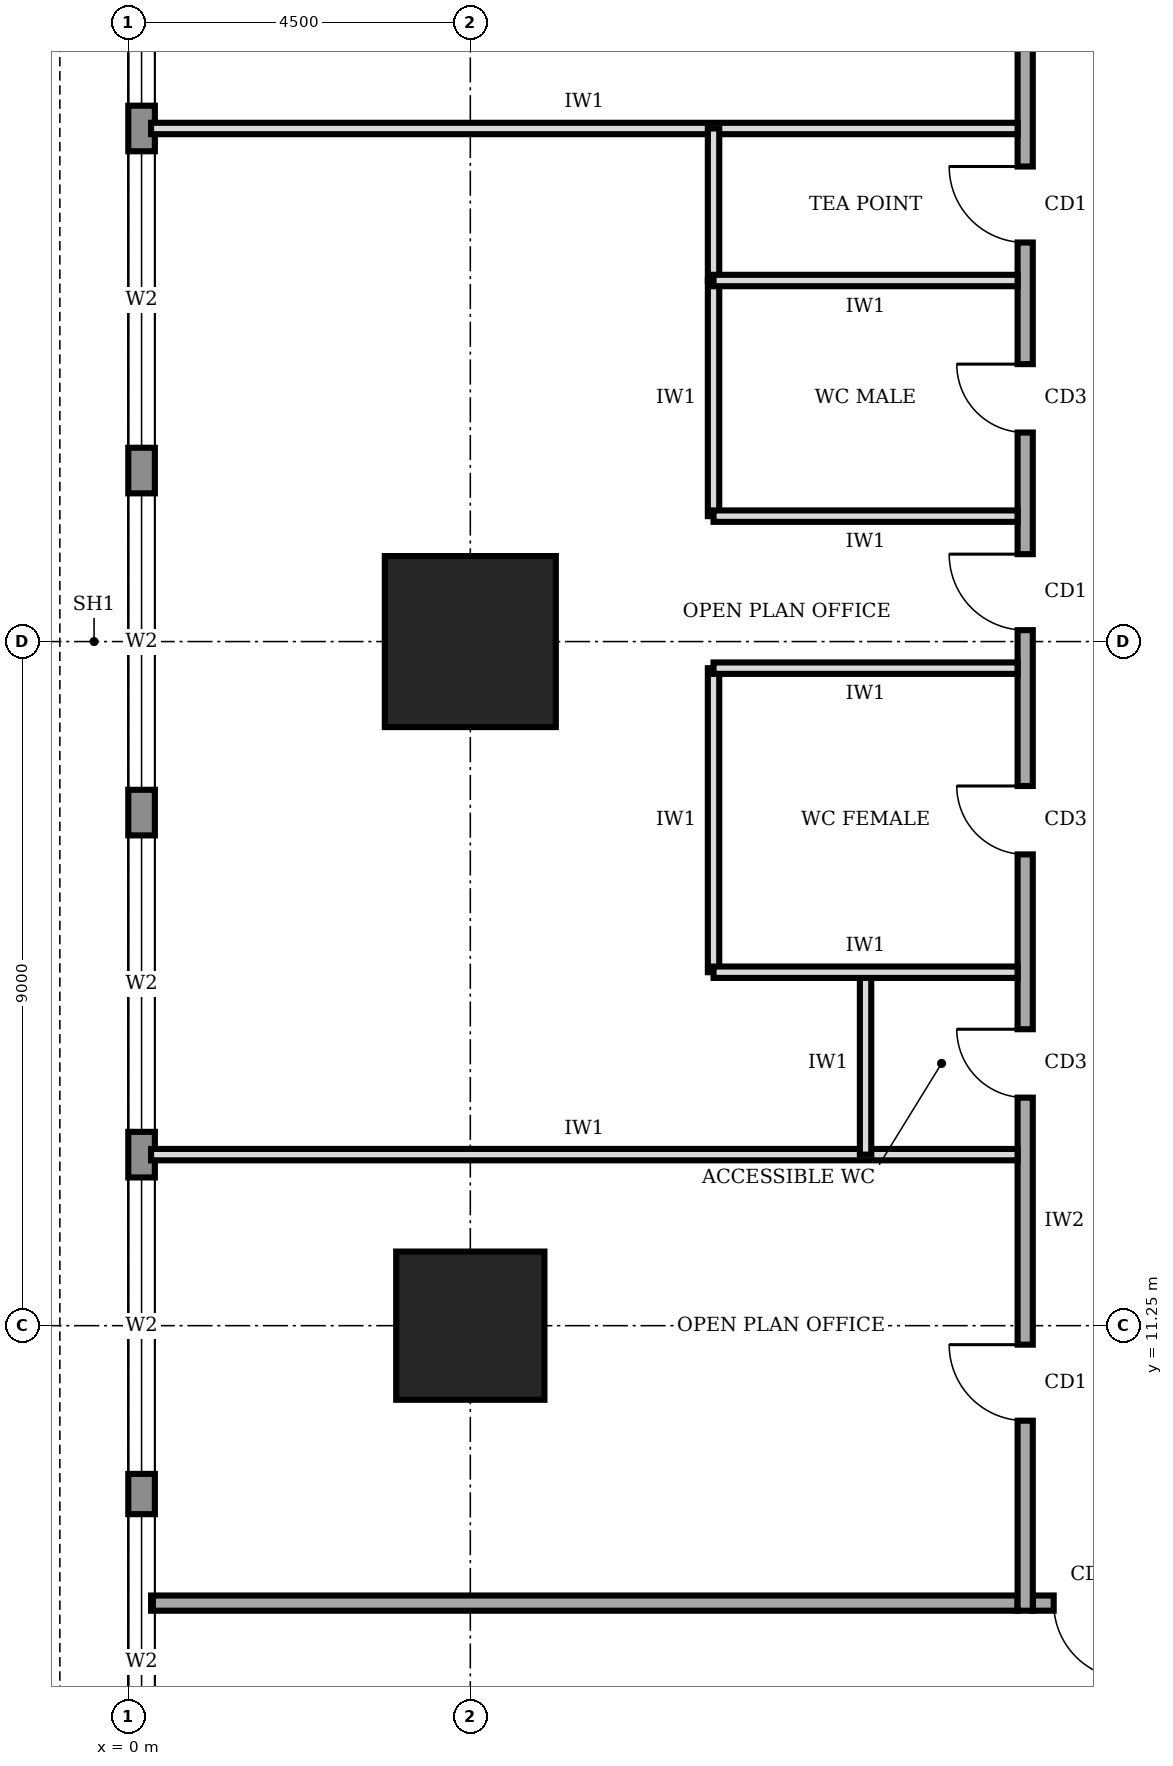
"""IFC4 building model, lengths in metres.
Left out: names, types, materials, properties, quantities, classifications, styles, units other than length and angle.
Written with IfcOpenShell. Run it as: python <this file> out.ifc"""

import sys

from ifc_helpers import new_model, si_unit, direction, frame, frame_2d, origin, origin_2d, place, context, subcontext, project, spatial, rectangle, extrude, element, fill, save


model = new_model("IFC4")
c1 = context("Model", 3, precision=1e-05, world=origin(), true_north=direction((0.0, 1.0)))
c2 = subcontext(c1, "Body", "Model", "MODEL_VIEW")
j1 = project(units=[si_unit("LENGTHUNIT", "METRE"), si_unit("PLANEANGLEUNIT", "RADIAN")], contexts=[c1])
p1 = place(None, origin())
s1 = spatial("IfcSite", under=j1, at=p1, CompositionType="ELEMENT")
p2 = place(p1, origin())
s2 = spatial("IfcBuilding", under=s1, at=p2, CompositionType="ELEMENT")
p3 = place(p2, frame((0.0, 0.0, 241.0)))
s3 = spatial("IfcBuildingStorey", under=s2, at=p3, CompositionType="ELEMENT", Elevation=241.0)
p4 = place(p3, frame((4.5, 11.25, 0.0), z_axis=(0.0, 0.0, 1.0), x_axis=(1.0, 0.0, 0.0)))
e1 = element("IfcColumn", 1, at=p4, inside=s3, PredefinedType="COLUMN", context=c2, shape_type="SweptSolid", body=[
    extrude(rectangle(XDim=1.95, YDim=1.95, at=origin_2d()), origin(), (0.0, 0.0, 1.0), 4.0),
])
p5 = place(p3, frame((4.5, 20.25, 0.0), z_axis=(0.0, 0.0, 1.0), x_axis=(1.0, 0.0, 0.0)))
e2 = element("IfcColumn", 2, at=p5, inside=s3, PredefinedType="COLUMN", context=c2, shape_type="SweptSolid", body=[
    extrude(rectangle(XDim=2.25, YDim=2.25, at=origin_2d()), origin(), (0.0, 0.0, 1.0), 4.0),
])
p6 = place(p3, frame((0.175, 35.98, 0.0), z_axis=(0.0, 0.0, 1.0), x_axis=(0.0, -1.0, 0.0)))
e3 = element("IfcWall", 3, at=p6, inside=s3, PredefinedType="STANDARD", context=c2, shape_type="SweptSolid", body=[
    extrude(rectangle(XDim=31.46, YDim=0.35, at=frame_2d((15.73, 0.0))), origin(), (0.0, 0.0, 1.0), 3.75),
])
p7 = place(p6, frame((27.21, 0.0, 0.6)))
e4 = element("IfcOpeningElement", 4, at=p7, cuts=e3, PredefinedType="OPENING", context=c2, shape_type="SweptSolid", body=[
    extrude(rectangle(XDim=3.9, YDim=2.6, at=frame_2d((1.95, 1.3))), frame((0.0, 0.185, 0.0), z_axis=(0.0, -1.0, 0.0), x_axis=(1.0, 0.0, 0.0)), (0.0, 0.0, 1.0), 0.37),
])
p8 = place(p6, frame((22.78, 0.0, 0.6)))
e5 = element("IfcOpeningElement", 5, at=p8, cuts=e3, PredefinedType="OPENING", context=c2, shape_type="SweptSolid", body=[
    extrude(rectangle(XDim=3.9, YDim=2.6, at=frame_2d((1.95, 1.3))), frame((0.0, 0.185, 0.0), z_axis=(0.0, -1.0, 0.0), x_axis=(1.0, 0.0, 0.0)), (0.0, 0.0, 1.0), 0.37),
])
p9 = place(p6, frame((18.28, 0.0, 0.6)))
e6 = element("IfcOpeningElement", 6, at=p9, cuts=e3, PredefinedType="OPENING", context=c2, shape_type="SweptSolid", body=[
    extrude(rectangle(XDim=3.9, YDim=2.6, at=frame_2d((1.95, 1.3))), frame((0.0, 0.185, 0.0), z_axis=(0.0, -1.0, 0.0), x_axis=(1.0, 0.0, 0.0)), (0.0, 0.0, 1.0), 0.37),
])
p10 = place(p6, frame((13.78, 0.0, 0.6)))
e7 = element("IfcOpeningElement", 7, at=p10, cuts=e3, PredefinedType="OPENING", context=c2, shape_type="SweptSolid", body=[
    extrude(rectangle(XDim=3.9, YDim=2.6, at=frame_2d((1.95, 1.3))), frame((0.0, 0.185, 0.0), z_axis=(0.0, -1.0, 0.0), x_axis=(1.0, 0.0, 0.0)), (0.0, 0.0, 1.0), 0.37),
])
p11 = place(p6, frame((9.28, 0.0, 0.6)))
e8 = element("IfcOpeningElement", 8, at=p11, cuts=e3, PredefinedType="OPENING", context=c2, shape_type="SweptSolid", body=[
    extrude(rectangle(XDim=3.9, YDim=2.6, at=frame_2d((1.95, 1.3))), frame((0.0, 0.185, 0.0), z_axis=(0.0, -1.0, 0.0), x_axis=(1.0, 0.0, 0.0)), (0.0, 0.0, 1.0), 0.37),
])
p12 = place(p6, frame((4.78, 0.0, 0.6)))
e9 = element("IfcOpeningElement", 9, at=p12, cuts=e3, PredefinedType="OPENING", context=c2, shape_type="SweptSolid", body=[
    extrude(rectangle(XDim=3.9, YDim=2.6, at=frame_2d((1.95, 1.3))), frame((0.0, 0.185, 0.0), z_axis=(0.0, -1.0, 0.0), x_axis=(1.0, 0.0, 0.0)), (0.0, 0.0, 1.0), 0.37),
])
p13 = place(p3, frame((11.9, 7.6, 0.0), z_axis=(0.0, 0.0, 1.0), x_axis=(1.0, 0.0, 0.0)))
e10 = element("IfcWall", 10, at=p13, inside=s3, PredefinedType="SOLIDWALL", context=c2, shape_type="SweptSolid", body=[
    extrude(rectangle(XDim=16.9, YDim=0.2, at=frame_2d((8.45, 0.0))), origin(), (0.0, 0.0, 1.0), 3.75),
])
p14 = place(p13, frame((0.275, 0.0, 0.0)))
e11 = element("IfcOpeningElement", 11, at=p14, cuts=e10, PredefinedType="OPENING", context=c2, shape_type="SweptSolid", body=[
    extrude(rectangle(XDim=1.0, YDim=2.1, at=frame_2d((0.5, 1.05))), frame((0.0, 0.11, 0.0), z_axis=(0.0, -1.0, 0.0), x_axis=(1.0, 0.0, 0.0)), (0.0, 0.0, 1.0), 0.22),
])
p15 = place(p3, frame((11.8, 32.8, 0.0), z_axis=(0.0, 0.0, 1.0), x_axis=(0.0, -1.0, 0.0)))
e12 = element("IfcWall", 12, at=p15, inside=s3, PredefinedType="SOLIDWALL", context=c2, shape_type="SweptSolid", body=[
    extrude(rectangle(XDim=25.3, YDim=0.2, at=frame_2d((12.65, 0.0))), origin(), (0.0, 0.0, 1.0), 3.75),
])
p16 = place(p15, frame((21.8, 0.0, 0.0)))
e13 = element("IfcOpeningElement", 13, at=p16, cuts=e12, PredefinedType="OPENING", context=c2, shape_type="SweptSolid", body=[
    extrude(rectangle(XDim=1.0, YDim=2.1, at=frame_2d((0.5, 1.05))), frame((0.0, 0.11, 0.0), z_axis=(0.0, -1.0, 0.0), x_axis=(1.0, 0.0, 0.0)), (0.0, 0.0, 1.0), 0.22),
])
p17 = place(p15, frame((17.65, 0.0, 0.0)))
e14 = element("IfcOpeningElement", 14, at=p17, cuts=e12, PredefinedType="OPENING", context=c2, shape_type="SweptSolid", body=[
    extrude(rectangle(XDim=0.9, YDim=2.1, at=frame_2d((0.45, 1.05))), frame((0.0, 0.11, 0.0), z_axis=(0.0, -1.0, 0.0), x_axis=(1.0, 0.0, 0.0)), (0.0, 0.0, 1.0), 0.22),
])
p18 = place(p15, frame((14.45, 0.0, 0.0)))
e15 = element("IfcOpeningElement", 15, at=p18, cuts=e12, PredefinedType="OPENING", context=c2, shape_type="SweptSolid", body=[
    extrude(rectangle(XDim=0.9, YDim=2.1, at=frame_2d((0.45, 1.05))), frame((0.0, 0.11, 0.0), z_axis=(0.0, -1.0, 0.0), x_axis=(1.0, 0.0, 0.0)), (0.0, 0.0, 1.0), 0.22),
])
p19 = place(p15, frame((8.9, 0.0, 0.0)))
e16 = element("IfcOpeningElement", 16, at=p19, cuts=e12, PredefinedType="OPENING", context=c2, shape_type="SweptSolid", body=[
    extrude(rectangle(XDim=0.9, YDim=2.1, at=frame_2d((0.45, 1.05))), frame((0.0, 0.11, 0.0), z_axis=(0.0, -1.0, 0.0), x_axis=(1.0, 0.0, 0.0)), (0.0, 0.0, 1.0), 0.22),
])
p20 = place(p15, frame((6.3, 0.0, 0.0)))
e17 = element("IfcOpeningElement", 17, at=p20, cuts=e12, PredefinedType="OPENING", context=c2, shape_type="SweptSolid", body=[
    extrude(rectangle(XDim=1.0, YDim=2.1, at=frame_2d((0.5, 1.05))), frame((0.0, 0.11, 0.0), z_axis=(0.0, -1.0, 0.0), x_axis=(1.0, 0.0, 0.0)), (0.0, 0.0, 1.0), 0.22),
])
p21 = place(p15, frame((11.4, 0.0, 0.0)))
e18 = element("IfcOpeningElement", 18, at=p21, cuts=e12, PredefinedType="OPENING", context=c2, shape_type="SweptSolid", body=[
    extrude(rectangle(XDim=1.0, YDim=2.1, at=frame_2d((0.5, 1.05))), frame((0.0, 0.11, 0.0), z_axis=(0.0, -1.0, 0.0), x_axis=(1.0, 0.0, 0.0)), (0.0, 0.0, 1.0), 0.22),
])
p22 = place(p15, frame((2.3, 0.0, 0.0)))
e19 = element("IfcOpeningElement", 19, at=p22, cuts=e12, PredefinedType="OPENING", context=c2, shape_type="SweptSolid", body=[
    extrude(rectangle(XDim=1.0, YDim=2.1, at=frame_2d((0.5, 1.05))), frame((0.0, 0.11, 0.0), z_axis=(0.0, -1.0, 0.0), x_axis=(1.0, 0.0, 0.0)), (0.0, 0.0, 1.0), 0.22),
])
p23 = place(p3, frame((0.3, 7.6, 0.0), z_axis=(0.0, 0.0, 1.0), x_axis=(1.0, 0.0, 0.0)))
e20 = element("IfcWall", 20, at=p23, inside=s3, PredefinedType="SOLIDWALL", context=c2, shape_type="SweptSolid", body=[
    extrude(rectangle(XDim=11.4, YDim=0.2, at=frame_2d((5.7, 0.0))), origin(), (0.0, 0.0, 1.0), 3.75),
])
for number, where, z_axis, x_axis in (
    (21, (0.3, 13.5, 0.0), (0.0, 0.0, 1.0), (1.0, 0.0, 0.0)),
    (22, (0.3, 27.0, 0.0), (0.0, 0.0, 1.0), (1.0, 0.0, 0.0)),
):
    element("IfcWall", number, at=place(p3, frame(where, z_axis=z_axis, x_axis=x_axis)), inside=s3, PredefinedType="PARTITIONING", context=c2, shape_type="SweptSolid", body=[
        extrude(rectangle(XDim=11.4, YDim=0.15, at=frame_2d((5.7, 0.0))), origin(), (0.0, 0.0, 1.0), 3.75),
    ])
for number, where, z_axis, x_axis in (
    (23, (11.7, 15.9, 0.0), (0.0, 0.0, 1.0), (-1.0, 0.0, 0.0)),
    (24, (11.7, 19.9, 0.0), (0.0, 0.0, 1.0), (-1.0, 0.0, 0.0)),
    (25, (11.7, 21.9, 0.0), (0.0, 0.0, 1.0), (-1.0, 0.0, 0.0)),
    (26, (11.7, 25.0, 0.0), (0.0, 0.0, 1.0), (-1.0, 0.0, 0.0)),
):
    element("IfcWall", number, at=place(p3, frame(where, z_axis=z_axis, x_axis=x_axis)), inside=s3, PredefinedType="PARTITIONING", context=c2, shape_type="SweptSolid", body=[
        extrude(rectangle(XDim=4.0, YDim=0.15, at=frame_2d((2.0, 0.0))), origin(), (0.0, 0.0, 1.0), 3.75),
    ])
p24 = place(p3, frame((9.7, 13.5, 0.0), z_axis=(0.0, 0.0, 1.0), x_axis=(0.0, 1.0, 0.0)))
e27 = element("IfcWall", 27, at=p24, inside=s3, PredefinedType="PARTITIONING", context=c2, shape_type="SweptSolid", body=[
    extrude(rectangle(XDim=2.4, YDim=0.15, at=frame_2d((1.2, 0.0))), origin(), (0.0, 0.0, 1.0), 3.75),
])
p25 = place(p3, frame((7.7, 15.9, 0.0), z_axis=(0.0, 0.0, 1.0), x_axis=(0.0, 1.0, 0.0)))
e28 = element("IfcWall", 28, at=p25, inside=s3, PredefinedType="PARTITIONING", context=c2, shape_type="SweptSolid", body=[
    extrude(rectangle(XDim=4.0, YDim=0.15, at=frame_2d((2.0, 0.0))), origin(), (0.0, 0.0, 1.0), 3.75),
])
p26 = place(p3, frame((7.7, 21.9, 0.0), z_axis=(0.0, 0.0, 1.0), x_axis=(0.0, 1.0, 0.0)))
e29 = element("IfcWall", 29, at=p26, inside=s3, PredefinedType="PARTITIONING", context=c2, shape_type="SweptSolid", body=[
    extrude(rectangle(XDim=3.1, YDim=0.15, at=frame_2d((1.55, 0.0))), origin(), (0.0, 0.0, 1.0), 3.75),
])
p27 = place(p3, frame((7.7, 25.0, 0.0), z_axis=(0.0, 0.0, 1.0), x_axis=(0.0, 1.0, 0.0)))
e30 = element("IfcWall", 30, at=p27, inside=s3, PredefinedType="PARTITIONING", context=c2, shape_type="SweptSolid", body=[
    extrude(rectangle(XDim=2.0, YDim=0.15, at=frame_2d((1.0, 0.0))), origin(), (0.0, 0.0, 1.0), 3.75),
])
p28 = place(p7, origin())
e31 = element("IfcWindow", 31, at=p28, inside=s3, PartitioningType="SINGLE_PANEL", PredefinedType="WINDOW", context=c2, shape_type="SweptSolid", body=[
    extrude(rectangle(XDim=3.9, YDim=2.6, at=frame_2d((1.95, 1.3))), frame((0.0, 0.03, 0.0), z_axis=(0.0, -1.0, 0.0), x_axis=(1.0, 0.0, 0.0)), (0.0, 0.0, 1.0), 0.06),
])
fill(e4, e31)
p29 = place(p8, origin())
e32 = element("IfcWindow", 32, at=p29, inside=s3, PartitioningType="SINGLE_PANEL", PredefinedType="WINDOW", context=c2, shape_type="SweptSolid", body=[
    extrude(rectangle(XDim=3.9, YDim=2.6, at=frame_2d((1.95, 1.3))), frame((0.0, 0.03, 0.0), z_axis=(0.0, -1.0, 0.0), x_axis=(1.0, 0.0, 0.0)), (0.0, 0.0, 1.0), 0.06),
])
fill(e5, e32)
p30 = place(p9, origin())
e33 = element("IfcWindow", 33, at=p30, inside=s3, PartitioningType="SINGLE_PANEL", PredefinedType="WINDOW", context=c2, shape_type="SweptSolid", body=[
    extrude(rectangle(XDim=3.9, YDim=2.6, at=frame_2d((1.95, 1.3))), frame((0.0, 0.03, 0.0), z_axis=(0.0, -1.0, 0.0), x_axis=(1.0, 0.0, 0.0)), (0.0, 0.0, 1.0), 0.06),
])
fill(e6, e33)
p31 = place(p10, origin())
e34 = element("IfcWindow", 34, at=p31, inside=s3, PartitioningType="SINGLE_PANEL", PredefinedType="WINDOW", context=c2, shape_type="SweptSolid", body=[
    extrude(rectangle(XDim=3.9, YDim=2.6, at=frame_2d((1.95, 1.3))), frame((0.0, 0.03, 0.0), z_axis=(0.0, -1.0, 0.0), x_axis=(1.0, 0.0, 0.0)), (0.0, 0.0, 1.0), 0.06),
])
fill(e7, e34)
p32 = place(p11, origin())
e35 = element("IfcWindow", 35, at=p32, inside=s3, PartitioningType="SINGLE_PANEL", PredefinedType="WINDOW", context=c2, shape_type="SweptSolid", body=[
    extrude(rectangle(XDim=3.9, YDim=2.6, at=frame_2d((1.95, 1.3))), frame((0.0, 0.03, 0.0), z_axis=(0.0, -1.0, 0.0), x_axis=(1.0, 0.0, 0.0)), (0.0, 0.0, 1.0), 0.06),
])
fill(e8, e35)
p33 = place(p12, origin())
e36 = element("IfcWindow", 36, at=p33, inside=s3, PartitioningType="SINGLE_PANEL", PredefinedType="WINDOW", context=c2, shape_type="SweptSolid", body=[
    extrude(rectangle(XDim=3.9, YDim=2.6, at=frame_2d((1.95, 1.3))), frame((0.0, 0.03, 0.0), z_axis=(0.0, -1.0, 0.0), x_axis=(1.0, 0.0, 0.0)), (0.0, 0.0, 1.0), 0.06),
])
fill(e9, e36)
p34 = place(p14, frame((1.0, 0.0, 0.0), z_axis=(0.0, 0.0, 1.0), x_axis=(-1.0, 0.0, 0.0)))
e37 = element("IfcDoor", 37, at=p34, inside=s3, OperationType="SINGLE_SWING_LEFT", PredefinedType="DOOR", context=c2, shape_type="SweptSolid", body=[
    extrude(rectangle(XDim=1.0, YDim=2.1, at=frame_2d((0.5, 1.05))), frame((0.0, 0.025, 0.0), z_axis=(0.0, -1.0, 0.0), x_axis=(1.0, 0.0, 0.0)), (0.0, 0.0, 1.0), 0.05),
])
fill(e11, e37)
p35 = place(p16, frame((1.0, 0.0, 0.0), z_axis=(0.0, 0.0, 1.0), x_axis=(-1.0, 0.0, 0.0)))
e38 = element("IfcDoor", 38, at=p35, inside=s3, OperationType="SINGLE_SWING_RIGHT", PredefinedType="DOOR", context=c2, shape_type="SweptSolid", body=[
    extrude(rectangle(XDim=1.0, YDim=2.1, at=frame_2d((0.5, 1.05))), frame((0.0, 0.025, 0.0), z_axis=(0.0, -1.0, 0.0), x_axis=(1.0, 0.0, 0.0)), (0.0, 0.0, 1.0), 0.05),
])
fill(e13, e38)
p36 = place(p17, frame((0.9, 0.0, 0.0), z_axis=(0.0, 0.0, 1.0), x_axis=(-1.0, 0.0, 0.0)))
e39 = element("IfcDoor", 39, at=p36, inside=s3, OperationType="SINGLE_SWING_RIGHT", PredefinedType="DOOR", context=c2, shape_type="SweptSolid", body=[
    extrude(rectangle(XDim=0.9, YDim=2.1, at=frame_2d((0.45, 1.05))), frame((0.0, 0.025, 0.0), z_axis=(0.0, -1.0, 0.0), x_axis=(1.0, 0.0, 0.0)), (0.0, 0.0, 1.0), 0.05),
])
fill(e14, e39)
p37 = place(p18, frame((0.9, 0.0, 0.0), z_axis=(0.0, 0.0, 1.0), x_axis=(-1.0, 0.0, 0.0)))
e40 = element("IfcDoor", 40, at=p37, inside=s3, OperationType="SINGLE_SWING_RIGHT", PredefinedType="DOOR", context=c2, shape_type="SweptSolid", body=[
    extrude(rectangle(XDim=0.9, YDim=2.1, at=frame_2d((0.45, 1.05))), frame((0.0, 0.025, 0.0), z_axis=(0.0, -1.0, 0.0), x_axis=(1.0, 0.0, 0.0)), (0.0, 0.0, 1.0), 0.05),
])
fill(e15, e40)
p38 = place(p19, frame((0.9, 0.0, 0.0), z_axis=(0.0, 0.0, 1.0), x_axis=(-1.0, 0.0, 0.0)))
e41 = element("IfcDoor", 41, at=p38, inside=s3, OperationType="SINGLE_SWING_RIGHT", PredefinedType="DOOR", context=c2, shape_type="SweptSolid", body=[
    extrude(rectangle(XDim=0.9, YDim=2.1, at=frame_2d((0.45, 1.05))), frame((0.0, 0.025, 0.0), z_axis=(0.0, -1.0, 0.0), x_axis=(1.0, 0.0, 0.0)), (0.0, 0.0, 1.0), 0.05),
])
fill(e16, e41)
p39 = place(p20, frame((1.0, 0.0, 0.0), z_axis=(0.0, 0.0, 1.0), x_axis=(-1.0, 0.0, 0.0)))
e42 = element("IfcDoor", 42, at=p39, inside=s3, OperationType="SINGLE_SWING_RIGHT", PredefinedType="DOOR", context=c2, shape_type="SweptSolid", body=[
    extrude(rectangle(XDim=1.0, YDim=2.1, at=frame_2d((0.5, 1.05))), frame((0.0, 0.025, 0.0), z_axis=(0.0, -1.0, 0.0), x_axis=(1.0, 0.0, 0.0)), (0.0, 0.0, 1.0), 0.05),
])
fill(e17, e42)
p40 = place(p21, frame((1.0, 0.0, 0.0), z_axis=(0.0, 0.0, 1.0), x_axis=(-1.0, 0.0, 0.0)))
e43 = element("IfcDoor", 43, at=p40, inside=s3, OperationType="SINGLE_SWING_RIGHT", PredefinedType="DOOR", context=c2, shape_type="SweptSolid", body=[
    extrude(rectangle(XDim=1.0, YDim=2.1, at=frame_2d((0.5, 1.05))), frame((0.0, 0.025, 0.0), z_axis=(0.0, -1.0, 0.0), x_axis=(1.0, 0.0, 0.0)), (0.0, 0.0, 1.0), 0.05),
])
fill(e18, e43)
save(model, sys.argv[1])
